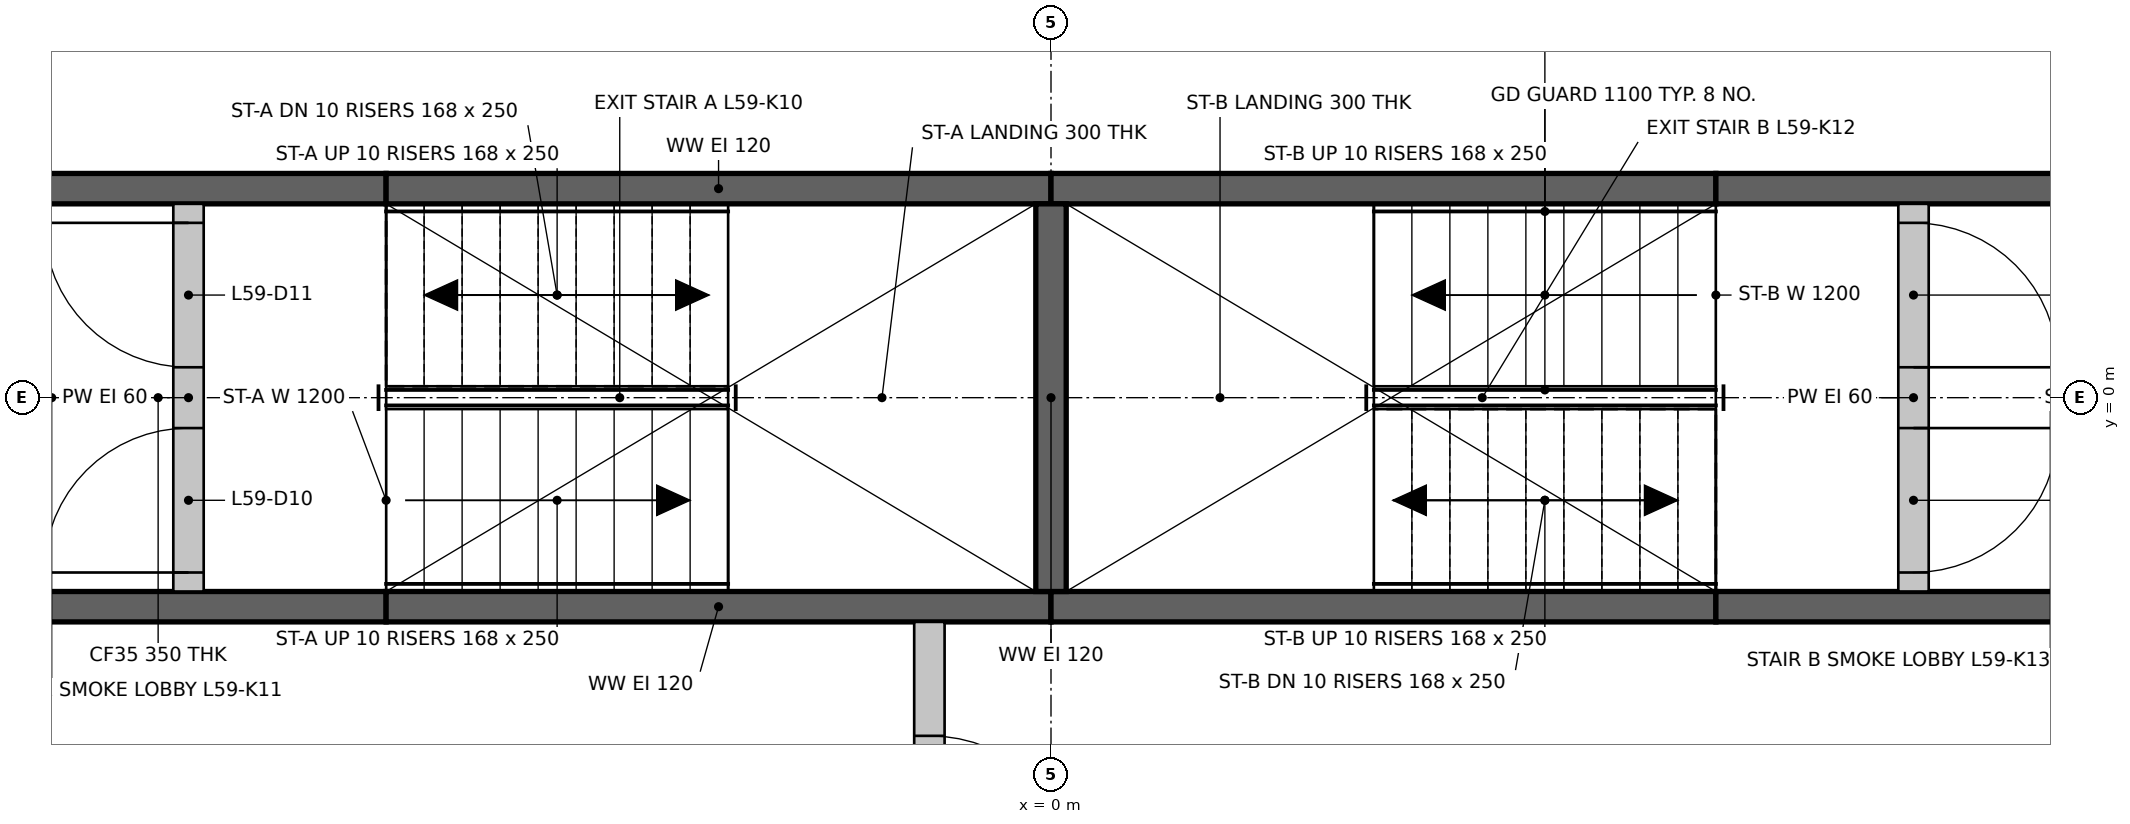
"""IFC4 building model, lengths in metres.
Left out: names, types, materials, properties, quantities, classifications, styles, units other than length and angle.
Written with IfcOpenShell. Run it as: python <this file> out.ifc"""

import sys

from ifc_helpers import new_model, si_unit, direction, frame, frame_2d, origin, place, context, subcontext, project, spatial, rectangle, extrude, element, fill, save


model = new_model("IFC4")
c1 = context("Model", 3, precision=1e-05, world=origin(), true_north=direction((0.0, 1.0)))
c2 = subcontext(c1, "Body", "Model", "MODEL_VIEW")
j1 = project(units=[si_unit("LENGTHUNIT", "METRE"), si_unit("PLANEANGLEUNIT", "RADIAN")], contexts=[c1])
p1 = place(None, origin())
s1 = spatial("IfcSite", under=j1, at=p1, CompositionType="ELEMENT")
p2 = place(p1, origin())
s2 = spatial("IfcBuilding", under=s1, at=p2, CompositionType="ELEMENT")
p3 = place(p2, frame((0.0, 0.0, 221.15)))
s3 = spatial("IfcBuildingStorey", under=s2, at=p3, CompositionType="ELEMENT", Elevation=221.15)
p4 = place(p3, frame((-7.374, -1.375, 0.0), z_axis=(0.0, 0.0, 1.0), x_axis=(1.0, 0.0, 0.0)))
e1 = element("IfcWall", 1, at=p4, inside=s3, PredefinedType="SHEAR", context=c2, shape_type="SweptSolid", body=[
    extrude(rectangle(XDim=3.0, YDim=0.2, at=frame_2d((1.5, 0.0))), origin(), (0.0, 0.0, 1.0), 3.0),
])
for number, where, z_axis, x_axis in (
    (2, (-4.374, -1.375, 0.0), (0.0, 0.0, 1.0), (1.0, 0.0, 0.0)),
    (3, (0.0, -1.375, 0.0), (0.0, 0.0, 1.0), (1.0, 0.0, 0.0)),
):
    element("IfcWall", number, at=place(p3, frame(where, z_axis=z_axis, x_axis=x_axis)), inside=s3, PredefinedType="SHEAR", context=c2, shape_type="SweptSolid", body=[
        extrude(rectangle(XDim=4.374, YDim=0.2, at=frame_2d((2.187, 0.0))), origin(), (0.0, 0.0, 1.0), 3.0),
    ])
for number, where, z_axis, x_axis in (
    (4, (4.374, -1.375, 0.0), (0.0, 0.0, 1.0), (1.0, 0.0, 0.0)),
    (5, (-7.374, 1.375, 0.0), (0.0, 0.0, 1.0), (1.0, 0.0, 0.0)),
):
    element("IfcWall", number, at=place(p3, frame(where, z_axis=z_axis, x_axis=x_axis)), inside=s3, PredefinedType="SHEAR", context=c2, shape_type="SweptSolid", body=[
        extrude(rectangle(XDim=3.0, YDim=0.2, at=frame_2d((1.5, 0.0))), origin(), (0.0, 0.0, 1.0), 3.0),
    ])
for number, where, z_axis, x_axis in (
    (6, (-4.374, 1.375, 0.0), (0.0, 0.0, 1.0), (1.0, 0.0, 0.0)),
    (7, (0.0, 1.375, 0.0), (0.0, 0.0, 1.0), (1.0, 0.0, 0.0)),
):
    element("IfcWall", number, at=place(p3, frame(where, z_axis=z_axis, x_axis=x_axis)), inside=s3, PredefinedType="SHEAR", context=c2, shape_type="SweptSolid", body=[
        extrude(rectangle(XDim=4.374, YDim=0.2, at=frame_2d((2.187, 0.0))), origin(), (0.0, 0.0, 1.0), 3.0),
    ])
p5 = place(p3, frame((4.374, 1.375, 0.0), z_axis=(0.0, 0.0, 1.0), x_axis=(1.0, 0.0, 0.0)))
e8 = element("IfcWall", 8, at=p5, inside=s3, PredefinedType="SHEAR", context=c2, shape_type="SweptSolid", body=[
    extrude(rectangle(XDim=3.0, YDim=0.2, at=frame_2d((1.5, 0.0))), origin(), (0.0, 0.0, 1.0), 3.0),
])
p6 = place(p3, frame((0.0, -1.275, 0.0), z_axis=(0.0, 0.0, 1.0), x_axis=(0.0, 1.0, 0.0)))
e9 = element("IfcWall", 9, at=p6, inside=s3, PredefinedType="SHEAR", context=c2, shape_type="SweptSolid", body=[
    extrude(rectangle(XDim=2.55, YDim=0.2, at=frame_2d((1.275, 0.0))), origin(), (0.0, 0.0, 1.0), 3.0),
])
p7 = place(p3, frame((-0.8, -3.974, 0.0), z_axis=(0.0, 0.0, 1.0), x_axis=(0.0, 1.0, 0.0)))
e10 = element("IfcWall", 10, at=p7, inside=s3, PredefinedType="PARTITIONING", context=c2, shape_type="SweptSolid", body=[
    extrude(rectangle(XDim=2.499, YDim=0.2, at=frame_2d((1.25, 0.0))), origin(), (0.0, 0.0, 1.0), 3.0),
])
p8 = place(p7, frame((0.75, 0.0, 0.0)))
e11 = element("IfcOpeningElement", 11, at=p8, cuts=e10, PredefinedType="OPENING", context=c2, shape_type="SweptSolid", body=[
    extrude(rectangle(XDim=1.0, YDim=2.1, at=frame_2d((0.5, 1.05))), frame((0.0, 0.11, 0.0), z_axis=(0.0, -1.0, 0.0), x_axis=(1.0, 0.0, 0.0)), (0.0, 0.0, 1.0), 0.22),
])
p9 = place(p3, frame((-5.674, -1.275, 0.0), z_axis=(0.0, 0.0, 1.0), x_axis=(0.0, 1.0, 0.0)))
e12 = element("IfcWall", 12, at=p9, inside=s3, PredefinedType="PARTITIONING", context=c2, shape_type="SweptSolid", body=[
    extrude(rectangle(XDim=2.55, YDim=0.2, at=frame_2d((1.275, 0.0))), origin(), (0.0, 0.0, 1.0), 3.0),
])
p10 = place(p9, frame((0.125, 0.0, 0.0)))
e13 = element("IfcOpeningElement", 13, at=p10, cuts=e12, PredefinedType="OPENING", context=c2, shape_type="SweptSolid", body=[
    extrude(rectangle(XDim=0.95, YDim=2.1, at=frame_2d((0.475, 1.05))), frame((0.0, 0.11, 0.0), z_axis=(0.0, -1.0, 0.0), x_axis=(1.0, 0.0, 0.0)), (0.0, 0.0, 1.0), 0.22),
])
p11 = place(p9, frame((1.475, 0.0, 0.0)))
e14 = element("IfcOpeningElement", 14, at=p11, cuts=e12, PredefinedType="OPENING", context=c2, shape_type="SweptSolid", body=[
    extrude(rectangle(XDim=0.95, YDim=2.1, at=frame_2d((0.475, 1.05))), frame((0.0, 0.11, 0.0), z_axis=(0.0, -1.0, 0.0), x_axis=(1.0, 0.0, 0.0)), (0.0, 0.0, 1.0), 0.22),
])
p12 = place(p3, frame((5.674, -1.275, 0.0), z_axis=(0.0, 0.0, 1.0), x_axis=(0.0, 1.0, 0.0)))
e15 = element("IfcWall", 15, at=p12, inside=s3, PredefinedType="PARTITIONING", context=c2, shape_type="SweptSolid", body=[
    extrude(rectangle(XDim=2.55, YDim=0.2, at=frame_2d((1.275, 0.0))), origin(), (0.0, 0.0, 1.0), 3.0),
])
p13 = place(p12, frame((0.125, 0.0, 0.0)))
e16 = element("IfcOpeningElement", 16, at=p13, cuts=e15, PredefinedType="OPENING", context=c2, shape_type="SweptSolid", body=[
    extrude(rectangle(XDim=0.95, YDim=2.1, at=frame_2d((0.475, 1.05))), frame((0.0, 0.11, 0.0), z_axis=(0.0, -1.0, 0.0), x_axis=(1.0, 0.0, 0.0)), (0.0, 0.0, 1.0), 0.22),
])
p14 = place(p12, frame((1.475, 0.0, 0.0)))
e17 = element("IfcOpeningElement", 17, at=p14, cuts=e15, PredefinedType="OPENING", context=c2, shape_type="SweptSolid", body=[
    extrude(rectangle(XDim=0.95, YDim=2.1, at=frame_2d((0.475, 1.05))), frame((0.0, 0.11, 0.0), z_axis=(0.0, -1.0, 0.0), x_axis=(1.0, 0.0, 0.0)), (0.0, 0.0, 1.0), 0.22),
])
p15 = place(p10, origin())
e18 = element("IfcDoor", 18, at=p15, inside=s3, OperationType="SINGLE_SWING_LEFT", PredefinedType="DOOR", context=c2, shape_type="SweptSolid", body=[
    extrude(rectangle(XDim=0.95, YDim=2.1, at=frame_2d((0.475, 1.05))), frame((0.0, 0.025, 0.0), z_axis=(0.0, -1.0, 0.0), x_axis=(1.0, 0.0, 0.0)), (0.0, 0.0, 1.0), 0.05),
])
fill(e13, e18)
p16 = place(p11, origin())
e19 = element("IfcDoor", 19, at=p16, inside=s3, OperationType="SINGLE_SWING_RIGHT", PredefinedType="DOOR", context=c2, shape_type="SweptSolid", body=[
    extrude(rectangle(XDim=0.95, YDim=2.1, at=frame_2d((0.475, 1.05))), frame((0.0, 0.025, 0.0), z_axis=(0.0, -1.0, 0.0), x_axis=(1.0, 0.0, 0.0)), (0.0, 0.0, 1.0), 0.05),
])
fill(e14, e19)
p17 = place(p13, frame((0.95, 0.0, 0.0), z_axis=(0.0, 0.0, 1.0), x_axis=(-1.0, 0.0, 0.0)))
e20 = element("IfcDoor", 20, at=p17, inside=s3, OperationType="SINGLE_SWING_RIGHT", PredefinedType="DOOR", context=c2, shape_type="SweptSolid", body=[
    extrude(rectangle(XDim=0.95, YDim=2.1, at=frame_2d((0.475, 1.05))), frame((0.0, 0.025, 0.0), z_axis=(0.0, -1.0, 0.0), x_axis=(1.0, 0.0, 0.0)), (0.0, 0.0, 1.0), 0.05),
])
fill(e16, e20)
p18 = place(p14, frame((0.95, 0.0, 0.0), z_axis=(0.0, 0.0, 1.0), x_axis=(-1.0, 0.0, 0.0)))
e21 = element("IfcDoor", 21, at=p18, inside=s3, OperationType="SINGLE_SWING_LEFT", PredefinedType="DOOR", context=c2, shape_type="SweptSolid", body=[
    extrude(rectangle(XDim=0.95, YDim=2.1, at=frame_2d((0.475, 1.05))), frame((0.0, 0.025, 0.0), z_axis=(0.0, -1.0, 0.0), x_axis=(1.0, 0.0, 0.0)), (0.0, 0.0, 1.0), 0.05),
])
fill(e17, e21)
p19 = place(p8, frame((1.0, 0.0, 0.0), z_axis=(0.0, 0.0, 1.0), x_axis=(-1.0, 0.0, 0.0)))
e22 = element("IfcDoor", 22, at=p19, inside=s3, OperationType="SINGLE_SWING_LEFT", PredefinedType="DOOR", context=c2, shape_type="SweptSolid", body=[
    extrude(rectangle(XDim=1.0, YDim=2.1, at=frame_2d((0.5, 1.05))), frame((0.0, 0.025, 0.0), z_axis=(0.0, -1.0, 0.0), x_axis=(1.0, 0.0, 0.0)), (0.0, 0.0, 1.0), 0.05),
])
fill(e11, e22)
save(model, sys.argv[1])
